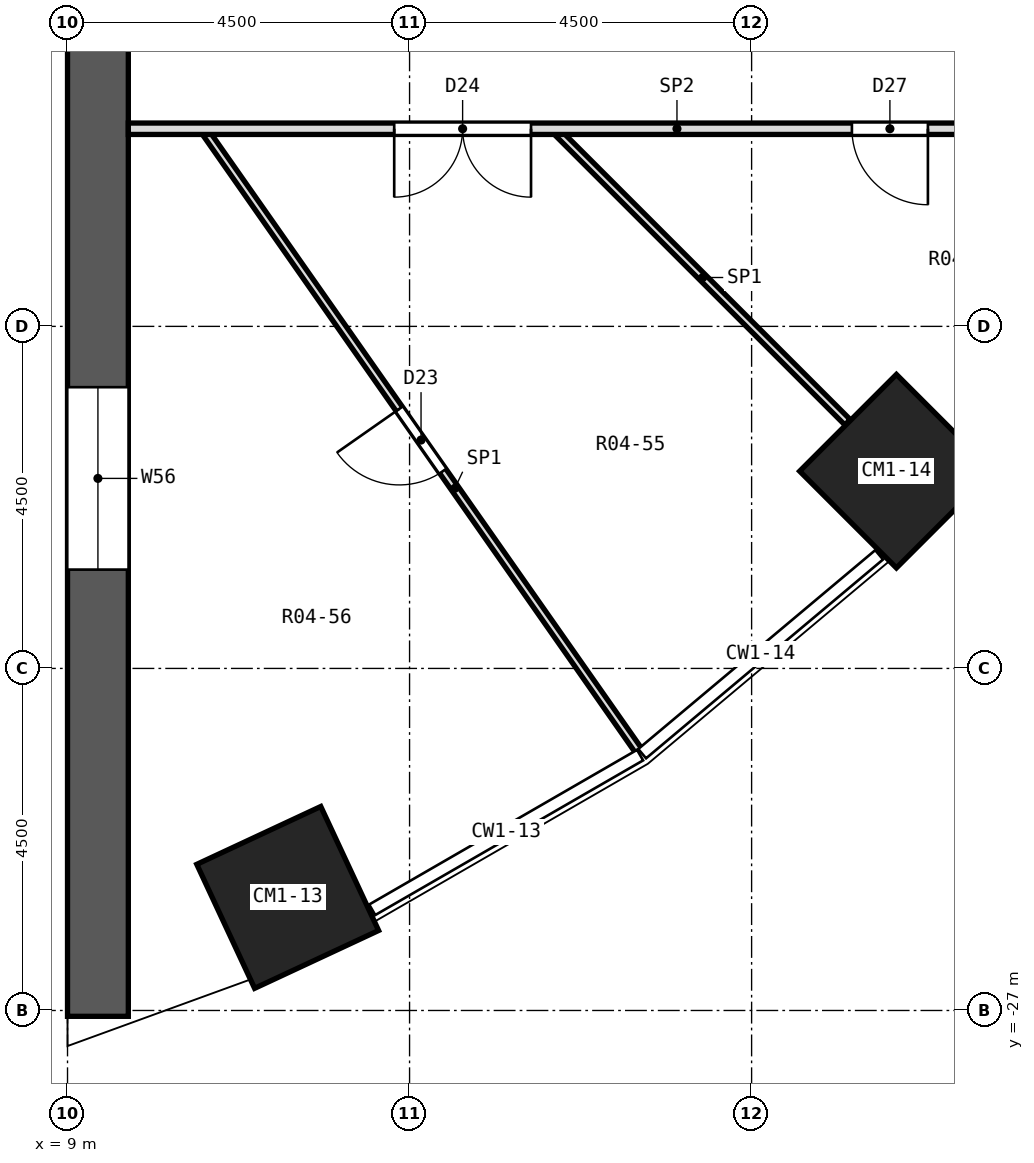
"""IFC4 building model, lengths in metres.
Left out: names, types, materials, properties, quantities, classifications, styles, units other than length and angle.
Written with IfcOpenShell. Run it as: python <this file> out.ifc"""

import sys

from ifc_helpers import new_model, si_unit, direction, frame, frame_2d, origin, origin_2d, place, context, subcontext, project, spatial, polyline, rectangle, outline, extrude, element, fill, save


model = new_model("IFC4")
c1 = context("Model", 3, precision=1e-05, world=origin(), true_north=direction((0.0, 1.0)))
c2 = subcontext(c1, "Body", "Model", "MODEL_VIEW")
j1 = project(units=[si_unit("LENGTHUNIT", "METRE"), si_unit("PLANEANGLEUNIT", "RADIAN")], contexts=[c1])
p1 = place(None, origin())
s1 = spatial("IfcSite", under=j1, at=p1, CompositionType="ELEMENT")
p2 = place(p1, origin())
s2 = spatial("IfcBuilding", under=s1, at=p2, CompositionType="ELEMENT")
p3 = place(p2, frame((0.0, 0.0, 5.0)))
s3 = spatial("IfcBuildingStorey", under=s2, at=p3, CompositionType="ELEMENT", Elevation=5.0)
for number, where, z_axis, x_axis in (
    (1, (11.897, -25.512, 0.0), (0.0, 0.0, 1.0), (0.423, -0.906, 0.0)),
    (2, (19.905, -19.905, 0.0), (0.0, 0.0, 1.0), (0.707, -0.707, 0.0)),
):
    element("IfcColumn", number, at=place(p3, frame(where, z_axis=z_axis, x_axis=x_axis)), inside=s3, PredefinedType="COLUMN", context=c2, shape_type="SweptSolid", body=[
        extrude(rectangle(XDim=1.8, YDim=1.8, at=origin_2d()), origin(), (0.0, 0.0, 1.0), 4.2),
    ])
p4 = place(p3, frame((9.4, -27.077, 0.0), z_axis=(0.0, 0.0, 1.0), x_axis=(0.0, 1.0, 0.0)))
e3 = element("IfcWall", 3, at=p4, inside=s3, PredefinedType="SHEAR", context=c2, shape_type="SweptSolid", body=[
    extrude(rectangle(XDim=54.154, YDim=0.8, at=frame_2d((27.077, 0.0))), origin(), (0.0, 0.0, 1.0), 4.2),
])
p5 = place(p4, frame((13.277, 0.0, 0.9)))
e4 = element("IfcOpeningElement", 4, at=p5, cuts=e3, PredefinedType="OPENING", context=c2, shape_type="SweptSolid", body=[
    extrude(rectangle(XDim=2.4, YDim=2.1, at=frame_2d((1.2, 1.05))), frame((0.0, 0.412, 0.0), z_axis=(0.0, -1.0, 0.0), x_axis=(1.0, 0.0, 0.0)), (0.0, 0.0, 1.0), 0.824),
])
p6 = place(p4, frame((17.877, 0.0, 0.9)))
e5 = element("IfcOpeningElement", 5, at=p6, cuts=e3, PredefinedType="OPENING", context=c2, shape_type="SweptSolid", body=[
    extrude(rectangle(XDim=2.4, YDim=2.1, at=frame_2d((1.2, 1.05))), frame((0.0, 0.412, 0.0), z_axis=(0.0, -1.0, 0.0), x_axis=(1.0, 0.0, 0.0)), (0.0, 0.0, 1.0), 0.824),
])
p7 = place(p4, frame((22.477, 0.0, 0.9)))
e6 = element("IfcOpeningElement", 6, at=p7, cuts=e3, PredefinedType="OPENING", context=c2, shape_type="SweptSolid", body=[
    extrude(rectangle(XDim=2.4, YDim=2.1, at=frame_2d((1.2, 1.05))), frame((0.0, 0.412, 0.0), z_axis=(0.0, -1.0, 0.0), x_axis=(1.0, 0.0, 0.0)), (0.0, 0.0, 1.0), 0.824),
])
p8 = place(p4, frame((29.277, 0.0, 0.9)))
e7 = element("IfcOpeningElement", 7, at=p8, cuts=e3, PredefinedType="OPENING", context=c2, shape_type="SweptSolid", body=[
    extrude(rectangle(XDim=2.4, YDim=2.1, at=frame_2d((1.2, 1.05))), frame((0.0, 0.412, 0.0), z_axis=(0.0, -1.0, 0.0), x_axis=(1.0, 0.0, 0.0)), (0.0, 0.0, 1.0), 0.824),
])
p9 = place(p4, frame((33.877, 0.0, 0.9)))
e8 = element("IfcOpeningElement", 8, at=p9, cuts=e3, PredefinedType="OPENING", context=c2, shape_type="SweptSolid", body=[
    extrude(rectangle(XDim=2.4, YDim=2.1, at=frame_2d((1.2, 1.05))), frame((0.0, 0.412, 0.0), z_axis=(0.0, -1.0, 0.0), x_axis=(1.0, 0.0, 0.0)), (0.0, 0.0, 1.0), 0.824),
])
p10 = place(p4, frame((38.477, 0.0, 0.9)))
e9 = element("IfcOpeningElement", 9, at=p10, cuts=e3, PredefinedType="OPENING", context=c2, shape_type="SweptSolid", body=[
    extrude(rectangle(XDim=2.4, YDim=2.1, at=frame_2d((1.2, 1.05))), frame((0.0, 0.412, 0.0), z_axis=(0.0, -1.0, 0.0), x_axis=(1.0, 0.0, 0.0)), (0.0, 0.0, 1.0), 0.824),
])
p11 = place(p4, frame((5.877, 0.0, 0.9)))
e10 = element("IfcOpeningElement", 10, at=p11, cuts=e3, PredefinedType="OPENING", context=c2, shape_type="SweptSolid", body=[
    extrude(rectangle(XDim=2.4, YDim=2.1, at=frame_2d((1.2, 1.05))), frame((0.0, 0.412, 0.0), z_axis=(0.0, -1.0, 0.0), x_axis=(1.0, 0.0, 0.0)), (0.0, 0.0, 1.0), 0.824),
])
p12 = place(p4, frame((45.877, 0.0, 0.9)))
e11 = element("IfcOpeningElement", 11, at=p12, cuts=e3, PredefinedType="OPENING", context=c2, shape_type="SweptSolid", body=[
    extrude(rectangle(XDim=2.4, YDim=2.1, at=frame_2d((1.2, 1.05))), frame((0.0, 0.412, 0.0), z_axis=(0.0, -1.0, 0.0), x_axis=(1.0, 0.0, 0.0)), (0.0, 0.0, 1.0), 0.824),
])
p13 = place(p3, frame((11.637, -26.498, 0.0), z_axis=(0.341981019293, -0.939704755181, 0.001988852104), x_axis=(-0.939706613726, -0.341981695593, 3.2622e-08)))
e12 = element("IfcWall", 12, at=p13, inside=s3, PredefinedType="SOLIDWALL", context=c2, shape_type="SweptSolid", body=[
    extrude(outline(polyline([(0.0, 0.0), (2.81, 0.0), (2.81, -1.0), (2.852, -2.098), (2.977, -3.191), (3.171, -4.2), (2.81, -4.2), (2.81, -3.65), (-4.344e-05, -3.65), (0.0, 0.0)])), origin(), (0.0, 0.0, -1.0), 0.38),
])
p14 = place(p3, frame((10.826, -15.461, 0.0), z_axis=(0.0, 0.0, 1.0), x_axis=(0.573622474099, -0.819119806383, 0.0)))
e13 = element("IfcWall", 13, at=p14, inside=s3, PredefinedType="PARTITIONING", context=c2, shape_type="SweptSolid", body=[
    extrude(rectangle(XDim=9.925, YDim=0.1, at=frame_2d((4.962, 0.0))), origin(), (0.0, 0.0, 1.0), 3.65),
])
p15 = place(p14, frame((4.425, 0.0, 0.0)))
e14 = element("IfcOpeningElement", 14, at=p15, cuts=e13, PredefinedType="OPENING", context=c2, shape_type="SweptSolid", body=[
    extrude(rectangle(XDim=1.0, YDim=2.1, at=frame_2d((0.5, 1.05))), frame((0.0, 0.062, 0.0), z_axis=(0.0, -1.0, 0.0), x_axis=(1.0, 0.0, 0.0)), (0.0, 0.0, 1.0), 0.124),
])
p16 = place(p3, frame((15.453, -15.453, 0.0), z_axis=(0.0, 0.0, 1.0), x_axis=(0.707220086868, -0.706993457346, 0.0)))
e15 = element("IfcWall", 15, at=p16, inside=s3, PredefinedType="PARTITIONING", context=c2, shape_type="SweptSolid", body=[
    extrude(rectangle(XDim=5.386, YDim=0.1, at=frame_2d((2.693, 0.0))), origin(), (0.0, 0.0, 1.0), 3.65),
])
p17 = place(p3, frame((9.8, -15.4, 0.0), z_axis=(0.0, 0.0, 1.0), x_axis=(1.0, 0.0, 0.0)))
e16 = element("IfcWall", 16, at=p17, inside=s3, PredefinedType="PARTITIONING", context=c2, shape_type="SweptSolid", body=[
    extrude(rectangle(XDim=14.437, YDim=0.15, at=frame_2d((7.219, 0.0))), origin(), (0.0, 0.0, 1.0), 3.65),
])
p18 = place(p17, frame((3.498, 0.0, 0.0)))
e17 = element("IfcOpeningElement", 17, at=p18, cuts=e16, PredefinedType="OPENING", context=c2, shape_type="SweptSolid", body=[
    extrude(rectangle(XDim=1.8, YDim=2.1, at=frame_2d((0.9, 1.05))), frame((0.0, 0.087, 0.0), z_axis=(0.0, -1.0, 0.0), x_axis=(1.0, 0.0, 0.0)), (0.0, 0.0, 1.0), 0.174),
])
p19 = place(p17, frame((9.52, 0.0, 0.0)))
e18 = element("IfcOpeningElement", 18, at=p19, cuts=e16, PredefinedType="OPENING", context=c2, shape_type="SweptSolid", body=[
    extrude(rectangle(XDim=1.0, YDim=2.1, at=frame_2d((0.5, 1.05))), frame((0.0, 0.087, 0.0), z_axis=(0.0, -1.0, 0.0), x_axis=(1.0, 0.0, 0.0)), (0.0, 0.0, 1.0), 0.174),
])
p20 = place(p15, frame((1.0, 0.0, 0.0), z_axis=(0.0, 0.0, 1.0), x_axis=(-1.0, 0.0, 0.0)))
e19 = element("IfcDoor", 19, at=p20, inside=s3, OperationType="SINGLE_SWING_RIGHT", PredefinedType="DOOR", context=c2, shape_type="SweptSolid", body=[
    extrude(rectangle(XDim=1.0, YDim=2.1, at=frame_2d((0.5, 1.05))), frame((0.0, 0.025, 0.0), z_axis=(0.0, -1.0, 0.0), x_axis=(1.0, 0.0, 0.0)), (0.0, 0.0, 1.0), 0.05),
])
fill(e14, e19)
p21 = place(p18, frame((1.8, 0.0, 0.0), z_axis=(0.0, 0.0, 1.0), x_axis=(-1.0, 0.0, 0.0)))
e20 = element("IfcDoor", 20, at=p21, inside=s3, OperationType="DOUBLE_DOOR_SINGLE_SWING", PredefinedType="DOOR", context=c2, shape_type="SweptSolid", body=[
    extrude(rectangle(XDim=1.8, YDim=2.1, at=frame_2d((0.9, 1.05))), frame((0.0, 0.025, 0.0), z_axis=(0.0, -1.0, 0.0), x_axis=(1.0, 0.0, 0.0)), (0.0, 0.0, 1.0), 0.05),
])
fill(e17, e20)
p22 = place(p19, frame((1.0, 0.0, 0.0), z_axis=(0.0, 0.0, 1.0), x_axis=(-1.0, 0.0, 0.0)))
e21 = element("IfcDoor", 21, at=p22, inside=s3, OperationType="SINGLE_SWING_LEFT", PredefinedType="DOOR", context=c2, shape_type="SweptSolid", body=[
    extrude(rectangle(XDim=1.0, YDim=2.1, at=frame_2d((0.5, 1.05))), frame((0.0, 0.025, 0.0), z_axis=(0.0, -1.0, 0.0), x_axis=(1.0, 0.0, 0.0)), (0.0, 0.0, 1.0), 0.05),
])
fill(e18, e21)
p23 = place(p11, origin())
e22 = element("IfcWindow", 22, at=p23, inside=s3, PartitioningType="SINGLE_PANEL", PredefinedType="WINDOW", context=c2, shape_type="SweptSolid", body=[
    extrude(rectangle(XDim=2.4, YDim=2.1, at=frame_2d((1.2, 1.05))), frame((0.0, 0.03, 0.0), z_axis=(0.0, -1.0, 0.0), x_axis=(1.0, 0.0, 0.0)), (0.0, 0.0, 1.0), 0.06),
])
fill(e10, e22)
save(model, sys.argv[1])
